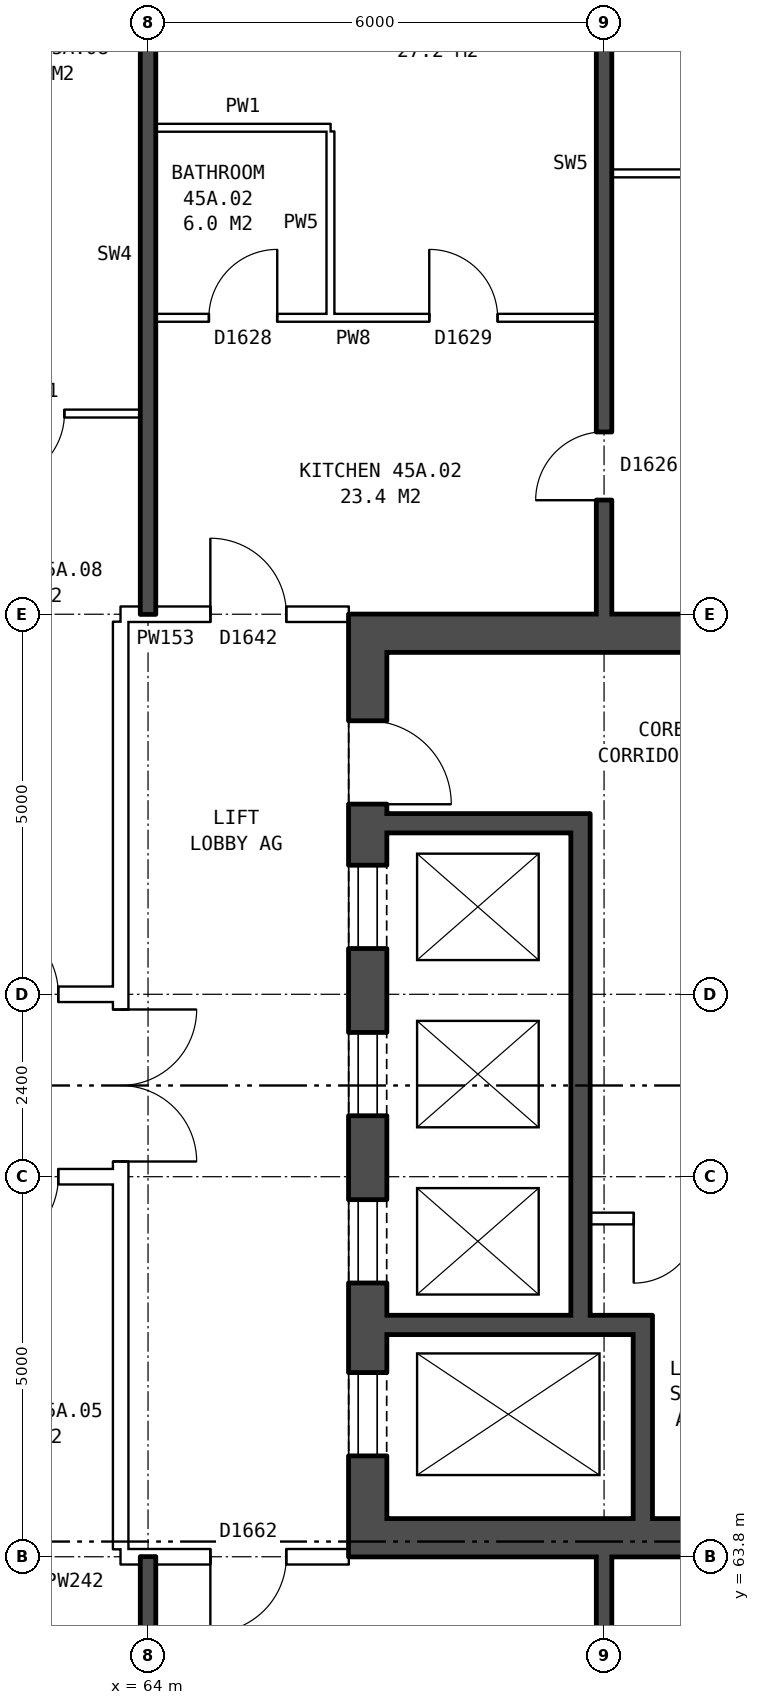
"""IFC4 building model, lengths in metres.
Left out: names, types, materials, properties, quantities, classifications, styles, units other than length and angle.
Written with IfcOpenShell. Run it as: python <this file> out.ifc"""

import sys

from ifc_helpers import new_model, si_unit, direction, frame, frame_2d, origin, place, context, subcontext, project, spatial, rectangle, extrude, element, fill, save


model = new_model("IFC4")
c1 = context("Model", 3, precision=1e-05, world=origin(), true_north=direction((0.0, 1.0)))
c2 = subcontext(c1, "Body", "Model", "MODEL_VIEW")
j1 = project(units=[si_unit("LENGTHUNIT", "METRE"), si_unit("PLANEANGLEUNIT", "RADIAN")], contexts=[c1])
p1 = place(None, origin())
s1 = spatial("IfcSite", under=j1, at=p1, CompositionType="ELEMENT")
p2 = place(p1, origin())
s2 = spatial("IfcBuilding", under=s1, at=p2, CompositionType="ELEMENT")
p3 = place(p2, frame((0.0, 0.0, 160.9)))
s3 = spatial("IfcBuildingStorey", under=s2, at=p3, CompositionType="ELEMENT", Elevation=160.9)
p4 = place(p3, frame((66.89, 63.8, 0.0), z_axis=(0.0, 0.0, 1.0), x_axis=(0.0, 1.0, 0.0)))
e1 = element("IfcWall", 1, at=p4, inside=s3, PredefinedType="SHEAR", context=c2, shape_type="SweptSolid", body=[
    extrude(rectangle(XDim=12.4, YDim=0.5, at=frame_2d((6.2, 0.0))), origin(), (0.0, 0.0, 1.0), 2.85),
])
p5 = place(p4, frame((1.325, 0.0, 0.0)))
e2 = element("IfcOpeningElement", 2, at=p5, cuts=e1, PredefinedType="OPENING", context=c2, shape_type="SweptSolid", body=[
    extrude(rectangle(XDim=1.1, YDim=2.1, at=frame_2d((0.55, 1.05))), frame((0.0, 0.26, 0.0), z_axis=(0.0, -1.0, 0.0), x_axis=(1.0, 0.0, 0.0)), (0.0, 0.0, 1.0), 0.52),
])
p6 = place(p4, frame((3.6, 0.0, 0.0)))
e3 = element("IfcOpeningElement", 3, at=p6, cuts=e1, PredefinedType="OPENING", context=c2, shape_type="SweptSolid", body=[
    extrude(rectangle(XDim=1.1, YDim=2.1, at=frame_2d((0.55, 1.05))), frame((0.0, 0.26, 0.0), z_axis=(0.0, -1.0, 0.0), x_axis=(1.0, 0.0, 0.0)), (0.0, 0.0, 1.0), 0.52),
])
p7 = place(p4, frame((5.8, 0.0, 0.0)))
e4 = element("IfcOpeningElement", 4, at=p7, cuts=e1, PredefinedType="OPENING", context=c2, shape_type="SweptSolid", body=[
    extrude(rectangle(XDim=1.1, YDim=2.1, at=frame_2d((0.55, 1.05))), frame((0.0, 0.26, 0.0), z_axis=(0.0, -1.0, 0.0), x_axis=(1.0, 0.0, 0.0)), (0.0, 0.0, 1.0), 0.52),
])
p8 = place(p4, frame((8.0, 0.0, 0.0)))
e5 = element("IfcOpeningElement", 5, at=p8, cuts=e1, PredefinedType="OPENING", context=c2, shape_type="SweptSolid", body=[
    extrude(rectangle(XDim=1.1, YDim=2.1, at=frame_2d((0.55, 1.05))), frame((0.0, 0.26, 0.0), z_axis=(0.0, -1.0, 0.0), x_axis=(1.0, 0.0, 0.0)), (0.0, 0.0, 1.0), 0.52),
])
p9 = place(p4, frame((9.9, 0.0, 0.0)))
e6 = element("IfcOpeningElement", 6, at=p9, cuts=e1, PredefinedType="OPENING", context=c2, shape_type="SweptSolid", body=[
    extrude(rectangle(XDim=1.1, YDim=2.1, at=frame_2d((0.55, 1.05))), frame((0.0, 0.26, 0.0), z_axis=(0.0, -1.0, 0.0), x_axis=(1.0, 0.0, 0.0)), (0.0, 0.0, 1.0), 0.52),
])
for number, where, z_axis, x_axis in (
    (7, (67.14, 64.05, 0.0), (0.0, 0.0, 1.0), (1.0, 0.0, 0.0)),
    (8, (67.14, 75.95, 0.0), (0.0, 0.0, 1.0), (1.0, 0.0, 0.0)),
):
    element("IfcWall", number, at=place(p3, frame(where, z_axis=z_axis, x_axis=x_axis)), inside=s3, PredefinedType="SHEAR", context=c2, shape_type="SweptSolid", body=[
        extrude(rectangle(XDim=8.0, YDim=0.5, at=frame_2d((4.0, 0.0))), origin(), (0.0, 0.0, 1.0), 2.85),
    ])
p10 = place(p3, frame((67.14, 66.85, 0.0), z_axis=(0.0, 0.0, 1.0), x_axis=(1.0, 0.0, 0.0)))
e9 = element("IfcWall", 9, at=p10, inside=s3, PredefinedType="SHEAR", context=c2, shape_type="SweptSolid", body=[
    extrude(rectangle(XDim=3.495, YDim=0.25, at=frame_2d((1.748, 0.0))), origin(), (0.0, 0.0, 1.0), 2.85),
])
p11 = place(p3, frame((69.815, 68.25, 0.0), z_axis=(0.0, 0.0, 1.0), x_axis=(1.0, 0.0, 0.0)))
e10 = element("IfcWall", 10, at=p11, inside=s3, PredefinedType="PARTITIONING", context=c2, shape_type="SweptSolid", body=[
    extrude(rectangle(XDim=2.0, YDim=0.15, at=frame_2d((1.0, 0.0))), origin(), (0.0, 0.0, 1.0), 2.85),
])
p12 = place(p11, frame((0.575, 0.0, 0.0)))
e11 = element("IfcOpeningElement", 11, at=p12, cuts=e10, PredefinedType="OPENING", context=c2, shape_type="SweptSolid", body=[
    extrude(rectangle(XDim=0.85, YDim=2.1, at=frame_2d((0.425, 1.05))), frame((0.0, 0.085, 0.0), z_axis=(0.0, -1.0, 0.0), x_axis=(1.0, 0.0, 0.0)), (0.0, 0.0, 1.0), 0.17),
])
p13 = place(p3, frame((67.14, 73.45, 0.0), z_axis=(0.0, 0.0, 1.0), x_axis=(1.0, 0.0, 0.0)))
e12 = element("IfcWall", 12, at=p13, inside=s3, PredefinedType="SHEAR", context=c2, shape_type="SweptSolid", body=[
    extrude(rectangle(XDim=2.425, YDim=0.25, at=frame_2d((1.212, 0.0))), origin(), (0.0, 0.0, 1.0), 2.85),
])
p14 = place(p3, frame((69.69, 66.975, 0.0), z_axis=(0.0, 0.0, 1.0), x_axis=(0.0, 1.0, 0.0)))
e13 = element("IfcWall", 13, at=p14, inside=s3, PredefinedType="SHEAR", context=c2, shape_type="SweptSolid", body=[
    extrude(rectangle(XDim=6.6, YDim=0.25, at=frame_2d((3.3, 0.0))), origin(), (0.0, 0.0, 1.0), 2.85),
])
p15 = place(p3, frame((70.51, 64.3, 0.0), z_axis=(0.0, 0.0, 1.0), x_axis=(0.0, 1.0, 0.0)))
e14 = element("IfcWall", 14, at=p15, inside=s3, PredefinedType="SHEAR", context=c2, shape_type="SweptSolid", body=[
    extrude(rectangle(XDim=2.425, YDim=0.25, at=frame_2d((1.212, 0.0))), origin(), (0.0, 0.0, 1.0), 2.85),
])
p16 = place(p3, frame((63.64, 63.9, 0.0), z_axis=(0.0, 0.0, 1.0), x_axis=(0.0, 1.0, 0.0)))
e15 = element("IfcWall", 15, at=p16, inside=s3, PredefinedType="PARTITIONING", context=c2, shape_type="SweptSolid", body=[
    extrude(rectangle(XDim=12.2, YDim=0.2, at=frame_2d((6.1, 0.0))), origin(), (0.0, 0.0, 1.0), 2.85),
])
p17 = place(p16, frame((5.1, 0.0, 0.0)))
e16 = element("IfcOpeningElement", 16, at=p17, cuts=e15, PredefinedType="OPENING", context=c2, shape_type="SweptSolid", body=[
    extrude(rectangle(XDim=2.0, YDim=2.1, at=frame_2d((1.0, 1.05))), frame((0.0, 0.11, 0.0), z_axis=(0.0, -1.0, 0.0), x_axis=(1.0, 0.0, 0.0)), (0.0, 0.0, 1.0), 0.22),
])
p18 = place(p3, frame((63.64, 63.8, 0.0), z_axis=(0.0, 0.0, 1.0), x_axis=(1.0, 0.0, 0.0)))
e17 = element("IfcWall", 17, at=p18, inside=s3, PredefinedType="PARTITIONING", context=c2, shape_type="SweptSolid", body=[
    extrude(rectangle(XDim=3.0, YDim=0.2, at=frame_2d((1.5, 0.0))), origin(), (0.0, 0.0, 1.0), 2.85),
])
p19 = place(p18, frame((1.18, 0.0, 0.0)))
e18 = element("IfcOpeningElement", 18, at=p19, cuts=e17, PredefinedType="OPENING", context=c2, shape_type="SweptSolid", body=[
    extrude(rectangle(XDim=1.0, YDim=2.1, at=frame_2d((0.5, 1.05))), frame((0.0, 0.11, 0.0), z_axis=(0.0, -1.0, 0.0), x_axis=(1.0, 0.0, 0.0)), (0.0, 0.0, 1.0), 0.22),
])
p20 = place(p3, frame((44.36, 68.8, 0.0), z_axis=(0.0, 0.0, 1.0), x_axis=(1.0, 0.0, 0.0)))
e19 = element("IfcWall", 19, at=p20, inside=s3, PredefinedType="PARTITIONING", context=c2, shape_type="SweptSolid", body=[
    extrude(rectangle(XDim=19.28, YDim=0.2, at=frame_2d((9.64, 0.0))), origin(), (0.0, 0.0, 1.0), 2.85),
])
p21 = place(p20, frame((17.46, 0.0, 0.0)))
e20 = element("IfcOpeningElement", 20, at=p21, cuts=e19, PredefinedType="OPENING", context=c2, shape_type="SweptSolid", body=[
    extrude(rectangle(XDim=1.0, YDim=2.1, at=frame_2d((0.5, 1.05))), frame((0.0, 0.11, 0.0), z_axis=(0.0, -1.0, 0.0), x_axis=(1.0, 0.0, 0.0)), (0.0, 0.0, 1.0), 0.22),
])
p22 = place(p20, frame((8.64, 0.0, 0.0)))
e21 = element("IfcOpeningElement", 21, at=p22, cuts=e19, PredefinedType="OPENING", context=c2, shape_type="SweptSolid", body=[
    extrude(rectangle(XDim=1.0, YDim=2.1, at=frame_2d((0.5, 1.05))), frame((0.0, 0.11, 0.0), z_axis=(0.0, -1.0, 0.0), x_axis=(1.0, 0.0, 0.0)), (0.0, 0.0, 1.0), 0.22),
])
p23 = place(p20, frame((2.64, 0.0, 0.0)))
e22 = element("IfcOpeningElement", 22, at=p23, cuts=e19, PredefinedType="OPENING", context=c2, shape_type="SweptSolid", body=[
    extrude(rectangle(XDim=1.0, YDim=2.1, at=frame_2d((0.5, 1.05))), frame((0.0, 0.11, 0.0), z_axis=(0.0, -1.0, 0.0), x_axis=(1.0, 0.0, 0.0)), (0.0, 0.0, 1.0), 0.22),
])
p24 = place(p3, frame((44.36, 71.2, 0.0), z_axis=(0.0, 0.0, 1.0), x_axis=(1.0, 0.0, 0.0)))
e23 = element("IfcWall", 23, at=p24, inside=s3, PredefinedType="PARTITIONING", context=c2, shape_type="SweptSolid", body=[
    extrude(rectangle(XDim=19.28, YDim=0.2, at=frame_2d((9.64, 0.0))), origin(), (0.0, 0.0, 1.0), 2.85),
])
p25 = place(p24, frame((17.46, 0.0, 0.0)))
e24 = element("IfcOpeningElement", 24, at=p25, cuts=e23, PredefinedType="OPENING", context=c2, shape_type="SweptSolid", body=[
    extrude(rectangle(XDim=1.0, YDim=2.1, at=frame_2d((0.5, 1.05))), frame((0.0, 0.11, 0.0), z_axis=(0.0, -1.0, 0.0), x_axis=(1.0, 0.0, 0.0)), (0.0, 0.0, 1.0), 0.22),
])
p26 = place(p24, frame((8.64, 0.0, 0.0)))
e25 = element("IfcOpeningElement", 25, at=p26, cuts=e23, PredefinedType="OPENING", context=c2, shape_type="SweptSolid", body=[
    extrude(rectangle(XDim=1.0, YDim=2.1, at=frame_2d((0.5, 1.05))), frame((0.0, 0.11, 0.0), z_axis=(0.0, -1.0, 0.0), x_axis=(1.0, 0.0, 0.0)), (0.0, 0.0, 1.0), 0.22),
])
p27 = place(p24, frame((2.64, 0.0, 0.0)))
e26 = element("IfcOpeningElement", 26, at=p27, cuts=e23, PredefinedType="OPENING", context=c2, shape_type="SweptSolid", body=[
    extrude(rectangle(XDim=1.0, YDim=2.1, at=frame_2d((0.5, 1.05))), frame((0.0, 0.11, 0.0), z_axis=(0.0, -1.0, 0.0), x_axis=(1.0, 0.0, 0.0)), (0.0, 0.0, 1.0), 0.22),
])
p28 = place(p3, frame((63.64, 76.2, 0.0), z_axis=(0.0, 0.0, 1.0), x_axis=(1.0, 0.0, 0.0)))
e27 = element("IfcWall", 27, at=p28, inside=s3, PredefinedType="PARTITIONING", context=c2, shape_type="SweptSolid", body=[
    extrude(rectangle(XDim=3.0, YDim=0.2, at=frame_2d((1.5, 0.0))), origin(), (0.0, 0.0, 1.0), 2.85),
])
p29 = place(p28, frame((1.18, 0.0, 0.0)))
e28 = element("IfcOpeningElement", 28, at=p29, cuts=e27, PredefinedType="OPENING", context=c2, shape_type="SweptSolid", body=[
    extrude(rectangle(XDim=1.0, YDim=2.1, at=frame_2d((0.5, 1.05))), frame((0.0, 0.11, 0.0), z_axis=(0.0, -1.0, 0.0), x_axis=(1.0, 0.0, 0.0)), (0.0, 0.0, 1.0), 0.22),
])
p30 = place(p3, frame((61.0, 78.84, 0.0), z_axis=(0.0, 0.0, 1.0), x_axis=(1.0, 0.0, 0.0)))
e29 = element("IfcWall", 29, at=p30, inside=s3, PredefinedType="PARTITIONING", context=c2, shape_type="SweptSolid", body=[
    extrude(rectangle(XDim=2.9, YDim=0.1, at=frame_2d((1.45, 0.0))), origin(), (0.0, 0.0, 1.0), 2.85),
])
p31 = place(p30, frame((1.0, 0.0, 0.0)))
e30 = element("IfcOpeningElement", 30, at=p31, cuts=e29, PredefinedType="OPENING", context=c2, shape_type="SweptSolid", body=[
    extrude(rectangle(XDim=0.9, YDim=2.1, at=frame_2d((0.45, 1.05))), frame((0.0, 0.06, 0.0), z_axis=(0.0, -1.0, 0.0), x_axis=(1.0, 0.0, 0.0)), (0.0, 0.0, 1.0), 0.12),
])
p32 = place(p3, frame((64.1, 80.1, 0.0), z_axis=(0.0, 0.0, 1.0), x_axis=(1.0, 0.0, 0.0)))
e31 = element("IfcWall", 31, at=p32, inside=s3, PredefinedType="PARTITIONING", context=c2, shape_type="SweptSolid", body=[
    extrude(rectangle(XDim=5.8, YDim=0.1, at=frame_2d((2.9, 0.0))), origin(), (0.0, 0.0, 1.0), 2.85),
])
p33 = place(p32, frame((3.6, 0.0, 0.0)))
e32 = element("IfcOpeningElement", 32, at=p33, cuts=e31, PredefinedType="OPENING", context=c2, shape_type="SweptSolid", body=[
    extrude(rectangle(XDim=0.9, YDim=2.1, at=frame_2d((0.45, 1.05))), frame((0.0, 0.06, 0.0), z_axis=(0.0, -1.0, 0.0), x_axis=(1.0, 0.0, 0.0)), (0.0, 0.0, 1.0), 0.12),
])
p34 = place(p32, frame((0.7, 0.0, 0.0)))
e33 = element("IfcOpeningElement", 33, at=p34, cuts=e31, PredefinedType="OPENING", context=c2, shape_type="SweptSolid", body=[
    extrude(rectangle(XDim=0.9, YDim=2.1, at=frame_2d((0.45, 1.05))), frame((0.0, 0.06, 0.0), z_axis=(0.0, -1.0, 0.0), x_axis=(1.0, 0.0, 0.0)), (0.0, 0.0, 1.0), 0.12),
])
p35 = place(p3, frame((70.1, 82.0, 0.0), z_axis=(0.0, 0.0, 1.0), x_axis=(1.0, 0.0, 0.0)))
e34 = element("IfcWall", 34, at=p35, inside=s3, PredefinedType="PARTITIONING", context=c2, shape_type="SweptSolid", body=[
    extrude(rectangle(XDim=5.54, YDim=0.1, at=frame_2d((2.77, 0.0))), origin(), (0.0, 0.0, 1.0), 2.85),
])
p36 = place(p35, frame((2.32, 0.0, 0.0)))
e35 = element("IfcOpeningElement", 35, at=p36, cuts=e34, PredefinedType="OPENING", context=c2, shape_type="SweptSolid", body=[
    extrude(rectangle(XDim=0.9, YDim=2.1, at=frame_2d((0.45, 1.05))), frame((0.0, 0.06, 0.0), z_axis=(0.0, -1.0, 0.0), x_axis=(1.0, 0.0, 0.0)), (0.0, 0.0, 1.0), 0.12),
])
p37 = place(p3, frame((64.1, 82.6, 0.0), z_axis=(0.0, 0.0, 1.0), x_axis=(1.0, 0.0, 0.0)))
e36 = element("IfcWall", 36, at=p37, inside=s3, PredefinedType="PARTITIONING", context=c2, shape_type="SweptSolid", body=[
    extrude(rectangle(XDim=2.3, YDim=0.1, at=frame_2d((1.15, 0.0))), origin(), (0.0, 0.0, 1.0), 2.85),
])
for number, where, z_axis, x_axis in (
    (37, (64.0, 54.36, 0.0), (0.0, 0.0, 1.0), (0.0, 1.0, 0.0)),
    (38, (64.0, 76.2, 0.0), (0.0, 0.0, 1.0), (0.0, 1.0, 0.0)),
):
    element("IfcWall", number, at=place(p3, frame(where, z_axis=z_axis, x_axis=x_axis)), inside=s3, PredefinedType="SOLIDWALL", context=c2, shape_type="SweptSolid", body=[
        extrude(rectangle(XDim=9.44, YDim=0.2, at=frame_2d((4.72, 0.0))), origin(), (0.0, 0.0, 1.0), 2.85),
    ])
p38 = place(p3, frame((66.4, 80.15, 0.0), z_axis=(0.0, 0.0, 1.0), x_axis=(0.0, 1.0, 0.0)))
e39 = element("IfcWall", 39, at=p38, inside=s3, PredefinedType="PARTITIONING", context=c2, shape_type="SweptSolid", body=[
    extrude(rectangle(XDim=2.4, YDim=0.1, at=frame_2d((1.2, 0.0))), origin(), (0.0, 0.0, 1.0), 2.85),
])
p39 = place(p3, frame((70.0, 54.36, 0.0), z_axis=(0.0, 0.0, 1.0), x_axis=(0.0, 1.0, 0.0)))
e40 = element("IfcWall", 40, at=p39, inside=s3, PredefinedType="SOLIDWALL", context=c2, shape_type="SweptSolid", body=[
    extrude(rectangle(XDim=9.44, YDim=0.2, at=frame_2d((4.72, 0.0))), origin(), (0.0, 0.0, 1.0), 2.85),
])
p40 = place(p39, frame((1.37, 0.0, 0.0)))
e41 = element("IfcOpeningElement", 41, at=p40, cuts=e40, PredefinedType="OPENING", context=c2, shape_type="SweptSolid", body=[
    extrude(rectangle(XDim=0.9, YDim=2.1, at=frame_2d((0.45, 1.05))), frame((0.0, 0.11, 0.0), z_axis=(0.0, -1.0, 0.0), x_axis=(1.0, 0.0, 0.0)), (0.0, 0.0, 1.0), 0.22),
])
p41 = place(p39, frame((7.04, 0.0, 0.0)))
e42 = element("IfcOpeningElement", 42, at=p41, cuts=e40, PredefinedType="OPENING", context=c2, shape_type="SweptSolid", body=[
    extrude(rectangle(XDim=0.9, YDim=2.1, at=frame_2d((0.45, 1.05))), frame((0.0, 0.11, 0.0), z_axis=(0.0, -1.0, 0.0), x_axis=(1.0, 0.0, 0.0)), (0.0, 0.0, 1.0), 0.22),
])
p42 = place(p3, frame((70.0, 76.2, 0.0), z_axis=(0.0, 0.0, 1.0), x_axis=(0.0, 1.0, 0.0)))
e43 = element("IfcWall", 43, at=p42, inside=s3, PredefinedType="SOLIDWALL", context=c2, shape_type="SweptSolid", body=[
    extrude(rectangle(XDim=9.44, YDim=0.2, at=frame_2d((4.72, 0.0))), origin(), (0.0, 0.0, 1.0), 2.85),
])
p43 = place(p42, frame((1.5, 0.0, 0.0)))
e44 = element("IfcOpeningElement", 44, at=p43, cuts=e43, PredefinedType="OPENING", context=c2, shape_type="SweptSolid", body=[
    extrude(rectangle(XDim=0.9, YDim=2.1, at=frame_2d((0.45, 1.05))), frame((0.0, 0.11, 0.0), z_axis=(0.0, -1.0, 0.0), x_axis=(1.0, 0.0, 0.0)), (0.0, 0.0, 1.0), 0.22),
])
p44 = place(p5, origin())
e45 = element("IfcDoor", 45, at=p44, inside=s3, OperationType="DOUBLE_DOOR_SLIDING", PredefinedType="DOOR", context=c2, shape_type="SweptSolid", body=[
    extrude(rectangle(XDim=1.1, YDim=2.1, at=frame_2d((0.55, 1.05))), frame((0.0, -0.185, 0.0), z_axis=(0.0, -1.0, 0.0), x_axis=(1.0, 0.0, 0.0)), (0.0, 0.0, 1.0), 0.05),
])
fill(e2, e45)
p45 = place(p6, origin())
e46 = element("IfcDoor", 46, at=p45, inside=s3, OperationType="DOUBLE_DOOR_SLIDING", PredefinedType="DOOR", context=c2, shape_type="SweptSolid", body=[
    extrude(rectangle(XDim=1.1, YDim=2.1, at=frame_2d((0.55, 1.05))), frame((0.0, -0.185, 0.0), z_axis=(0.0, -1.0, 0.0), x_axis=(1.0, 0.0, 0.0)), (0.0, 0.0, 1.0), 0.05),
])
fill(e3, e46)
p46 = place(p7, origin())
e47 = element("IfcDoor", 47, at=p46, inside=s3, OperationType="DOUBLE_DOOR_SLIDING", PredefinedType="DOOR", context=c2, shape_type="SweptSolid", body=[
    extrude(rectangle(XDim=1.1, YDim=2.1, at=frame_2d((0.55, 1.05))), frame((0.0, -0.185, 0.0), z_axis=(0.0, -1.0, 0.0), x_axis=(1.0, 0.0, 0.0)), (0.0, 0.0, 1.0), 0.05),
])
fill(e4, e47)
p47 = place(p8, origin())
e48 = element("IfcDoor", 48, at=p47, inside=s3, OperationType="DOUBLE_DOOR_SLIDING", PredefinedType="DOOR", context=c2, shape_type="SweptSolid", body=[
    extrude(rectangle(XDim=1.1, YDim=2.1, at=frame_2d((0.55, 1.05))), frame((0.0, -0.185, 0.0), z_axis=(0.0, -1.0, 0.0), x_axis=(1.0, 0.0, 0.0)), (0.0, 0.0, 1.0), 0.05),
])
fill(e5, e48)
p48 = place(p9, frame((1.1, 0.0, 0.0), z_axis=(0.0, 0.0, 1.0), x_axis=(-1.0, 0.0, 0.0)))
e49 = element("IfcDoor", 49, at=p48, inside=s3, OperationType="SINGLE_SWING_RIGHT", PredefinedType="DOOR", context=c2, shape_type="SweptSolid", body=[
    extrude(rectangle(XDim=1.1, YDim=2.1, at=frame_2d((0.55, 1.05))), frame((0.0, 0.235, 0.0), z_axis=(0.0, -1.0, 0.0), x_axis=(1.0, 0.0, 0.0)), (0.0, 0.0, 1.0), 0.05),
])
fill(e6, e49)
p49 = place(p12, frame((0.85, 0.0, 0.0), z_axis=(0.0, 0.0, 1.0), x_axis=(-1.0, 0.0, 0.0)))
e50 = element("IfcDoor", 50, at=p49, inside=s3, OperationType="SINGLE_SWING_RIGHT", PredefinedType="DOOR", context=c2, shape_type="SweptSolid", body=[
    extrude(rectangle(XDim=0.85, YDim=2.1, at=frame_2d((0.425, 1.05))), frame((0.0, 0.025, 0.0), z_axis=(0.0, -1.0, 0.0), x_axis=(1.0, 0.0, 0.0)), (0.0, 0.0, 1.0), 0.05),
])
fill(e11, e50)
p50 = place(p17, frame((2.0, 0.0, 0.0), z_axis=(0.0, 0.0, 1.0), x_axis=(-1.0, 0.0, 0.0)))
e51 = element("IfcDoor", 51, at=p50, inside=s3, OperationType="DOUBLE_DOOR_SINGLE_SWING", PredefinedType="DOOR", context=c2, shape_type="SweptSolid", body=[
    extrude(rectangle(XDim=2.0, YDim=2.1, at=frame_2d((1.0, 1.05))), frame((0.0, 0.025, 0.0), z_axis=(0.0, -1.0, 0.0), x_axis=(1.0, 0.0, 0.0)), (0.0, 0.0, 1.0), 0.05),
])
fill(e16, e51)
p51 = place(p19, frame((1.0, 0.0, 0.0), z_axis=(0.0, 0.0, 1.0), x_axis=(-1.0, 0.0, 0.0)))
e52 = element("IfcDoor", 52, at=p51, inside=s3, OperationType="SINGLE_SWING_RIGHT", PredefinedType="DOOR", context=c2, shape_type="SweptSolid", body=[
    extrude(rectangle(XDim=1.0, YDim=2.1, at=frame_2d((0.5, 1.05))), frame((0.0, 0.025, 0.0), z_axis=(0.0, -1.0, 0.0), x_axis=(1.0, 0.0, 0.0)), (0.0, 0.0, 1.0), 0.05),
])
fill(e18, e52)
p52 = place(p33, origin())
e53 = element("IfcDoor", 53, at=p52, inside=s3, OperationType="SINGLE_SWING_LEFT", PredefinedType="DOOR", context=c2, shape_type="SweptSolid", body=[
    extrude(rectangle(XDim=0.9, YDim=2.1, at=frame_2d((0.45, 1.05))), frame((0.0, 0.025, 0.0), z_axis=(0.0, -1.0, 0.0), x_axis=(1.0, 0.0, 0.0)), (0.0, 0.0, 1.0), 0.05),
])
fill(e32, e53)
p53 = place(p29, origin())
e54 = element("IfcDoor", 54, at=p53, inside=s3, OperationType="SINGLE_SWING_LEFT", PredefinedType="DOOR", context=c2, shape_type="SweptSolid", body=[
    extrude(rectangle(XDim=1.0, YDim=2.1, at=frame_2d((0.5, 1.05))), frame((0.0, 0.025, 0.0), z_axis=(0.0, -1.0, 0.0), x_axis=(1.0, 0.0, 0.0)), (0.0, 0.0, 1.0), 0.05),
])
fill(e28, e54)
p54 = place(p43, origin())
e55 = element("IfcDoor", 55, at=p54, inside=s3, OperationType="SINGLE_SWING_LEFT", PredefinedType="DOOR", context=c2, shape_type="SweptSolid", body=[
    extrude(rectangle(XDim=0.9, YDim=2.1, at=frame_2d((0.45, 1.05))), frame((0.0, 0.025, 0.0), z_axis=(0.0, -1.0, 0.0), x_axis=(1.0, 0.0, 0.0)), (0.0, 0.0, 1.0), 0.05),
])
fill(e44, e55)
p55 = place(p34, origin())
e56 = element("IfcDoor", 56, at=p55, inside=s3, OperationType="SINGLE_SWING_RIGHT", PredefinedType="DOOR", context=c2, shape_type="SweptSolid", body=[
    extrude(rectangle(XDim=0.9, YDim=2.1, at=frame_2d((0.45, 1.05))), frame((0.0, 0.025, 0.0), z_axis=(0.0, -1.0, 0.0), x_axis=(1.0, 0.0, 0.0)), (0.0, 0.0, 1.0), 0.05),
])
fill(e33, e56)
p56 = place(p21, frame((1.0, 0.0, 0.0), z_axis=(0.0, 0.0, 1.0), x_axis=(-1.0, 0.0, 0.0)))
e57 = element("IfcDoor", 57, at=p56, inside=s3, OperationType="SINGLE_SWING_RIGHT", PredefinedType="DOOR", context=c2, shape_type="SweptSolid", body=[
    extrude(rectangle(XDim=1.0, YDim=2.1, at=frame_2d((0.5, 1.05))), frame((0.0, 0.025, 0.0), z_axis=(0.0, -1.0, 0.0), x_axis=(1.0, 0.0, 0.0)), (0.0, 0.0, 1.0), 0.05),
])
fill(e20, e57)
p57 = place(p25, origin())
e58 = element("IfcDoor", 58, at=p57, inside=s3, OperationType="SINGLE_SWING_LEFT", PredefinedType="DOOR", context=c2, shape_type="SweptSolid", body=[
    extrude(rectangle(XDim=1.0, YDim=2.1, at=frame_2d((0.5, 1.05))), frame((0.0, 0.025, 0.0), z_axis=(0.0, -1.0, 0.0), x_axis=(1.0, 0.0, 0.0)), (0.0, 0.0, 1.0), 0.05),
])
fill(e24, e58)
p58 = place(p31, frame((0.9, 0.0, 0.0), z_axis=(0.0, 0.0, 1.0), x_axis=(-1.0, 0.0, 0.0)))
e59 = element("IfcDoor", 59, at=p58, inside=s3, OperationType="SINGLE_SWING_RIGHT", PredefinedType="DOOR", context=c2, shape_type="SweptSolid", body=[
    extrude(rectangle(XDim=0.9, YDim=2.1, at=frame_2d((0.45, 1.05))), frame((0.0, 0.025, 0.0), z_axis=(0.0, -1.0, 0.0), x_axis=(1.0, 0.0, 0.0)), (0.0, 0.0, 1.0), 0.05),
])
fill(e30, e59)
save(model, sys.argv[1])
